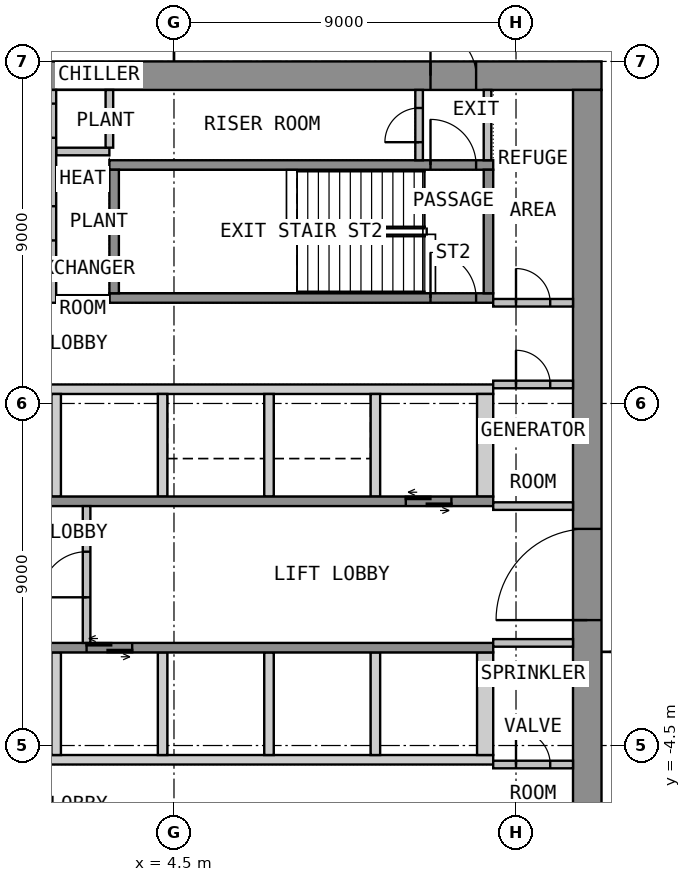
"""IFC4 building model, lengths in metres.
Left out: names, types, materials, properties, quantities, classifications, styles, units other than length and angle.
Written with IfcOpenShell. Run it as: python <this file> out.ifc"""

import sys

from ifc_helpers import new_model, si_unit, direction, frame, frame_2d, origin, place, context, subcontext, project, spatial, polyline, rectangle, outline, extrude, element, fill, save


model = new_model("IFC4")
c1 = context("Model", 3, precision=1e-05, world=origin(), true_north=direction((0.0, 1.0)))
c2 = subcontext(c1, "Body", "Model", "MODEL_VIEW")
j1 = project(units=[si_unit("LENGTHUNIT", "METRE"), si_unit("PLANEANGLEUNIT", "RADIAN")], contexts=[c1])
p1 = place(None, origin())
s1 = spatial("IfcSite", under=j1, at=p1, CompositionType="ELEMENT")
p2 = place(p1, origin())
s2 = spatial("IfcBuilding", under=s1, at=p2, CompositionType="ELEMENT")
p3 = place(p2, frame((0.0, 0.0, 128.1)))
s3 = spatial("IfcBuildingStorey", under=s2, at=p3, CompositionType="ELEMENT", Elevation=128.1)
p4 = place(p3, frame((-15.75, 13.125, 0.0), z_axis=(0.0, 0.0, 1.0), x_axis=(1.0, 0.0, 0.0)))
e1 = element("IfcWall", 1, at=p4, inside=s3, PredefinedType="SHEAR", context=c2, shape_type="SweptSolid", body=[
    extrude(rectangle(XDim=31.5, YDim=0.75, at=frame_2d((15.75, 0.0))), origin(), (0.0, 0.0, 1.0), 4.175),
])
p5 = place(p4, frame((14.55, 0.0, 0.0)))
e2 = element("IfcOpeningElement", 2, at=p5, cuts=e1, PredefinedType="OPENING", context=c2, shape_type="SweptSolid", body=[
    extrude(rectangle(XDim=2.4, YDim=2.1, at=frame_2d((1.2, 1.05))), frame((0.0, 0.385, 0.0), z_axis=(0.0, -1.0, 0.0), x_axis=(1.0, 0.0, 0.0)), (0.0, 0.0, 1.0), 0.77),
])
p6 = place(p4, frame((3.3, 0.0, 0.0)))
e3 = element("IfcOpeningElement", 3, at=p6, cuts=e1, PredefinedType="OPENING", context=c2, shape_type="SweptSolid", body=[
    extrude(rectangle(XDim=1.2, YDim=2.1, at=frame_2d((0.6, 1.05))), frame((0.0, 0.385, 0.0), z_axis=(0.0, -1.0, 0.0), x_axis=(1.0, 0.0, 0.0)), (0.0, 0.0, 1.0), 0.77),
])
p7 = place(p4, frame((27.0, 0.0, 0.0)))
e4 = element("IfcOpeningElement", 4, at=p7, cuts=e1, PredefinedType="OPENING", context=c2, shape_type="SweptSolid", body=[
    extrude(rectangle(XDim=1.2, YDim=2.1, at=frame_2d((0.6, 1.05))), frame((0.0, 0.385, 0.0), z_axis=(0.0, -1.0, 0.0), x_axis=(1.0, 0.0, 0.0)), (0.0, 0.0, 1.0), 0.77),
])
p8 = place(p3, frame((15.375, -12.75, 0.0), z_axis=(0.0, 0.0, 1.0), x_axis=(0.0, 1.0, 0.0)))
e5 = element("IfcWall", 5, at=p8, inside=s3, PredefinedType="SHEAR", context=c2, shape_type="SweptSolid", body=[
    extrude(rectangle(XDim=25.5, YDim=0.75, at=frame_2d((12.75, 0.0))), origin(), (0.0, 0.0, 1.0), 4.175),
])
p9 = place(p8, frame((11.55, 0.0, 0.0)))
e6 = element("IfcOpeningElement", 6, at=p9, cuts=e5, PredefinedType="OPENING", context=c2, shape_type="SweptSolid", body=[
    extrude(rectangle(XDim=2.4, YDim=2.1, at=frame_2d((1.2, 1.05))), frame((0.0, 0.385, 0.0), z_axis=(0.0, -1.0, 0.0), x_axis=(1.0, 0.0, 0.0)), (0.0, 0.0, 1.0), 0.77),
])
p10 = place(p3, origin())
e7 = element("IfcWall", 7, at=p10, inside=s3, PredefinedType="SHEAR", context=c2, shape_type="SweptSolid", body=[
    extrude(outline(polyline([(-12.9, 4.75), (12.9, 4.75), (12.9, 5.0), (-12.9, 5.0), (-12.9, 4.75)])), origin(), (0.0, 0.0, 1.0), 4.175),
])
p11 = place(p3, origin())
e8 = element("IfcWall", 8, at=p11, inside=s3, PredefinedType="SHEAR", context=c2, shape_type="SweptSolid", body=[
    extrude(outline(polyline([(1.275, 2.05), (1.525, 2.05), (1.525, 4.75), (1.275, 4.75), (1.275, 2.05)])), origin(), (0.0, 0.0, 1.0), 4.175),
])
p12 = place(p3, origin())
e9 = element("IfcWall", 9, at=p12, inside=s3, PredefinedType="SHEAR", context=c2, shape_type="SweptSolid", body=[
    extrude(outline(polyline([(4.075, 2.05), (4.325, 2.05), (4.325, 4.75), (4.075, 4.75), (4.075, 2.05)])), origin(), (0.0, 0.0, 1.0), 4.175),
])
p13 = place(p3, origin())
e10 = element("IfcWall", 10, at=p13, inside=s3, PredefinedType="SHEAR", context=c2, shape_type="SweptSolid", body=[
    extrude(outline(polyline([(6.875, 2.05), (7.125, 2.05), (7.125, 4.75), (6.875, 4.75), (6.875, 2.05)])), origin(), (0.0, 0.0, 1.0), 4.175),
])
p14 = place(p3, origin())
e11 = element("IfcWall", 11, at=p14, inside=s3, PredefinedType="SHEAR", context=c2, shape_type="SweptSolid", body=[
    extrude(outline(polyline([(9.675, 2.05), (9.925, 2.05), (9.925, 4.75), (9.675, 4.75), (9.675, 2.05)])), origin(), (0.0, 0.0, 1.0), 4.175),
])
p15 = place(p3, origin())
e12 = element("IfcWall", 12, at=p15, inside=s3, PredefinedType="SHEAR", context=c2, shape_type="SweptSolid", body=[
    extrude(outline(polyline([(12.475, 2.05), (12.9, 2.05), (12.9, 4.75), (12.475, 4.75), (12.475, 2.05)])), origin(), (0.0, 0.0, 1.0), 4.175),
])
p16 = place(p3, frame((-12.9, 1.925, 0.0), z_axis=(0.0, 0.0, 1.0), x_axis=(1.0, 0.0, 0.0)))
e13 = element("IfcWall", 13, at=p16, inside=s3, PredefinedType="SHEAR", context=c2, shape_type="SweptSolid", body=[
    extrude(rectangle(XDim=25.8, YDim=0.25, at=frame_2d((12.9, 0.0))), origin(), (0.0, 0.0, 1.0), 4.175),
])
p17 = place(p16, frame((12.3, 0.0, 0.0)))
e14 = element("IfcOpeningElement", 14, at=p17, cuts=e13, PredefinedType="OPENING", context=c2, shape_type="SweptSolid", body=[
    extrude(rectangle(XDim=1.2, YDim=2.1, at=frame_2d((0.6, 1.05))), frame((0.0, 0.135, 0.0), z_axis=(0.0, -1.0, 0.0), x_axis=(1.0, 0.0, 0.0)), (0.0, 0.0, 1.0), 0.27),
])
p18 = place(p16, frame((23.5, 0.0, 0.0)))
e15 = element("IfcOpeningElement", 15, at=p18, cuts=e13, PredefinedType="OPENING", context=c2, shape_type="SweptSolid", body=[
    extrude(rectangle(XDim=1.2, YDim=2.1, at=frame_2d((0.6, 1.05))), frame((0.0, 0.135, 0.0), z_axis=(0.0, -1.0, 0.0), x_axis=(1.0, 0.0, 0.0)), (0.0, 0.0, 1.0), 0.27),
])
p19 = place(p3, origin())
e16 = element("IfcWall", 16, at=p19, inside=s3, PredefinedType="SHEAR", context=c2, shape_type="SweptSolid", body=[
    extrude(outline(polyline([(-12.9, -5.0), (12.9, -5.0), (12.9, -4.75), (-12.9, -4.75), (-12.9, -5.0)])), origin(), (0.0, 0.0, 1.0), 4.175),
])
p20 = place(p3, origin())
e17 = element("IfcWall", 17, at=p20, inside=s3, PredefinedType="SHEAR", context=c2, shape_type="SweptSolid", body=[
    extrude(outline(polyline([(1.275, -4.75), (1.525, -4.75), (1.525, -2.05), (1.275, -2.05), (1.275, -4.75)])), origin(), (0.0, 0.0, 1.0), 4.175),
])
p21 = place(p3, origin())
e18 = element("IfcWall", 18, at=p21, inside=s3, PredefinedType="SHEAR", context=c2, shape_type="SweptSolid", body=[
    extrude(outline(polyline([(4.075, -4.75), (4.325, -4.75), (4.325, -2.05), (4.075, -2.05), (4.075, -4.75)])), origin(), (0.0, 0.0, 1.0), 4.175),
])
p22 = place(p3, origin())
e19 = element("IfcWall", 19, at=p22, inside=s3, PredefinedType="SHEAR", context=c2, shape_type="SweptSolid", body=[
    extrude(outline(polyline([(6.875, -4.75), (7.125, -4.75), (7.125, -2.05), (6.875, -2.05), (6.875, -4.75)])), origin(), (0.0, 0.0, 1.0), 4.175),
])
p23 = place(p3, origin())
e20 = element("IfcWall", 20, at=p23, inside=s3, PredefinedType="SHEAR", context=c2, shape_type="SweptSolid", body=[
    extrude(outline(polyline([(9.675, -4.75), (9.925, -4.75), (9.925, -2.05), (9.675, -2.05), (9.675, -4.75)])), origin(), (0.0, 0.0, 1.0), 4.175),
])
p24 = place(p3, origin())
e21 = element("IfcWall", 21, at=p24, inside=s3, PredefinedType="SHEAR", context=c2, shape_type="SweptSolid", body=[
    extrude(outline(polyline([(12.475, -4.75), (12.9, -4.75), (12.9, -2.05), (12.475, -2.05), (12.475, -4.75)])), origin(), (0.0, 0.0, 1.0), 4.175),
])
p25 = place(p3, frame((-12.9, -1.925, 0.0), z_axis=(0.0, 0.0, 1.0), x_axis=(1.0, 0.0, 0.0)))
e22 = element("IfcWall", 22, at=p25, inside=s3, PredefinedType="SHEAR", context=c2, shape_type="SweptSolid", body=[
    extrude(rectangle(XDim=25.8, YDim=0.25, at=frame_2d((12.9, 0.0))), origin(), (0.0, 0.0, 1.0), 4.175),
])
p26 = place(p25, frame((12.3, 0.0, 0.0)))
e23 = element("IfcOpeningElement", 23, at=p26, cuts=e22, PredefinedType="OPENING", context=c2, shape_type="SweptSolid", body=[
    extrude(rectangle(XDim=1.2, YDim=2.1, at=frame_2d((0.6, 1.05))), frame((0.0, 0.135, 0.0), z_axis=(0.0, -1.0, 0.0), x_axis=(1.0, 0.0, 0.0)), (0.0, 0.0, 1.0), 0.27),
])
p27 = place(p25, frame((15.1, 0.0, 0.0)))
e24 = element("IfcOpeningElement", 24, at=p27, cuts=e22, PredefinedType="OPENING", context=c2, shape_type="SweptSolid", body=[
    extrude(rectangle(XDim=1.2, YDim=2.1, at=frame_2d((0.6, 1.05))), frame((0.0, 0.135, 0.0), z_axis=(0.0, -1.0, 0.0), x_axis=(1.0, 0.0, 0.0)), (0.0, 0.0, 1.0), 0.27),
])
p28 = place(p3, frame((2.2, -1.8, 0.0), z_axis=(0.0, 0.0, 1.0), x_axis=(0.0, 1.0, 0.0)))
e25 = element("IfcWall", 25, at=p28, inside=s3, PredefinedType="PARTITIONING", context=c2, shape_type="SweptSolid", body=[
    extrude(rectangle(XDim=3.6, YDim=0.2, at=frame_2d((1.8, 0.0))), origin(), (0.0, 0.0, 1.0), 4.175),
])
p29 = place(p28, frame((1.2, 0.0, 0.0)))
e26 = element("IfcOpeningElement", 26, at=p29, cuts=e25, PredefinedType="OPENING", context=c2, shape_type="SweptSolid", body=[
    extrude(rectangle(XDim=1.2, YDim=2.1, at=frame_2d((0.6, 1.05))), frame((0.0, 0.11, 0.0), z_axis=(0.0, -1.0, 0.0), x_axis=(1.0, 0.0, 0.0)), (0.0, 0.0, 1.0), 0.22),
])
p30 = place(p3, frame((2.8, 7.275, 0.0), z_axis=(0.0, 0.0, 1.0), x_axis=(1.0, 0.0, 0.0)))
e27 = element("IfcWall", 27, at=p30, inside=s3, PredefinedType="SHEAR", context=c2, shape_type="SweptSolid", body=[
    extrude(rectangle(XDim=10.1, YDim=0.25, at=frame_2d((5.05, 0.0))), origin(), (0.0, 0.0, 1.0), 4.175),
])
p31 = place(p30, frame((8.45, 0.0, 0.0)))
e28 = element("IfcOpeningElement", 28, at=p31, cuts=e27, PredefinedType="OPENING", context=c2, shape_type="SweptSolid", body=[
    extrude(rectangle(XDim=1.2, YDim=2.1, at=frame_2d((0.6, 1.05))), frame((0.0, 0.135, 0.0), z_axis=(0.0, -1.0, 0.0), x_axis=(1.0, 0.0, 0.0)), (0.0, 0.0, 1.0), 0.27),
])
p32 = place(p3, frame((2.8, 10.775, 0.0), z_axis=(0.0, 0.0, 1.0), x_axis=(1.0, 0.0, 0.0)))
e29 = element("IfcWall", 29, at=p32, inside=s3, PredefinedType="SHEAR", context=c2, shape_type="SweptSolid", body=[
    extrude(rectangle(XDim=10.1, YDim=0.25, at=frame_2d((5.05, 0.0))), origin(), (0.0, 0.0, 1.0), 4.175),
])
p33 = place(p32, frame((8.45, 0.0, 0.0)))
e30 = element("IfcOpeningElement", 30, at=p33, cuts=e29, PredefinedType="OPENING", context=c2, shape_type="SweptSolid", body=[
    extrude(rectangle(XDim=1.2, YDim=2.1, at=frame_2d((0.6, 1.05))), frame((0.0, 0.135, 0.0), z_axis=(0.0, -1.0, 0.0), x_axis=(1.0, 0.0, 0.0)), (0.0, 0.0, 1.0), 0.27),
])
for number, where, z_axis, x_axis in (
    (31, (2.925, 7.4, 0.0), (0.0, 0.0, 1.0), (0.0, 1.0, 0.0)),
    (32, (12.775, 7.4, 0.0), (0.0, 0.0, 1.0), (0.0, 1.0, 0.0)),
):
    element("IfcWall", number, at=place(p3, frame(where, z_axis=z_axis, x_axis=x_axis)), inside=s3, PredefinedType="SHEAR", context=c2, shape_type="SweptSolid", body=[
        extrude(rectangle(XDim=3.25, YDim=0.25, at=frame_2d((1.625, 0.0))), origin(), (0.0, 0.0, 1.0), 4.175),
    ])
for number, where, z_axis, x_axis in (
    (33, (1.4, 7.25, 0.0), (0.0, 0.0, 1.0), (1.0, 0.0, 0.0)),
    (34, (1.4, 11.13, 0.0), (0.0, 0.0, 1.0), (1.0, 0.0, 0.0)),
):
    element("IfcWall", number, at=place(p3, frame(where, z_axis=z_axis, x_axis=x_axis)), inside=s3, PredefinedType="PARTITIONING", context=c2, shape_type="SweptSolid", body=[
        extrude(rectangle(XDim=1.4, YDim=0.2, at=frame_2d((0.7, 0.0))), origin(), (0.0, 0.0, 1.0), 4.175),
    ])
p34 = place(p3, frame((1.3, 7.15, 0.0), z_axis=(0.0, 0.0, 1.0), x_axis=(0.0, 1.0, 0.0)))
e35 = element("IfcWall", 35, at=p34, inside=s3, PredefinedType="PARTITIONING", context=c2, shape_type="SweptSolid", body=[
    extrude(rectangle(XDim=5.6, YDim=0.2, at=frame_2d((2.8, 0.0))), origin(), (0.0, 0.0, 1.0), 4.175),
])
p35 = place(p34, frame((1.64, 0.0, 0.0)))
e36 = element("IfcOpeningElement", 36, at=p35, cuts=e35, PredefinedType="OPENING", context=c2, shape_type="SweptSolid", body=[
    extrude(rectangle(XDim=0.9, YDim=2.1, at=frame_2d((0.45, 1.05))), frame((0.0, 0.11, 0.0), z_axis=(0.0, -1.0, 0.0), x_axis=(1.0, 0.0, 0.0)), (0.0, 0.0, 1.0), 0.22),
])
p36 = place(p34, frame((4.34, 0.0, 0.0)))
e37 = element("IfcOpeningElement", 37, at=p36, cuts=e35, PredefinedType="OPENING", context=c2, shape_type="SweptSolid", body=[
    extrude(rectangle(XDim=0.9, YDim=2.1, at=frame_2d((0.45, 1.05))), frame((0.0, 0.11, 0.0), z_axis=(0.0, -1.0, 0.0), x_axis=(1.0, 0.0, 0.0)), (0.0, 0.0, 1.0), 0.22),
])
p37 = place(p3, frame((12.75, 10.9, 0.0), z_axis=(0.0, 0.0, 1.0), x_axis=(0.0, 1.0, 0.0)))
e38 = element("IfcWall", 38, at=p37, inside=s3, PredefinedType="PARTITIONING", context=c2, shape_type="SweptSolid", body=[
    extrude(rectangle(XDim=1.85, YDim=0.2, at=frame_2d((0.925, 0.0))), origin(), (0.0, 0.0, 1.0), 4.175),
])
p38 = place(p3, frame((10.95, 10.9, 0.0), z_axis=(0.0, 0.0, 1.0), x_axis=(0.0, 1.0, 0.0)))
e39 = element("IfcWall", 39, at=p38, inside=s3, PredefinedType="PARTITIONING", context=c2, shape_type="SweptSolid", body=[
    extrude(rectangle(XDim=1.85, YDim=0.2, at=frame_2d((0.925, 0.0))), origin(), (0.0, 0.0, 1.0), 4.175),
])
p39 = place(p38, frame((0.475, 0.0, 0.0)))
e40 = element("IfcOpeningElement", 40, at=p39, cuts=e39, PredefinedType="OPENING", context=c2, shape_type="SweptSolid", body=[
    extrude(rectangle(XDim=0.9, YDim=2.1, at=frame_2d((0.45, 1.05))), frame((0.0, 0.11, 0.0), z_axis=(0.0, -1.0, 0.0), x_axis=(1.0, 0.0, 0.0)), (0.0, 0.0, 1.0), 0.22),
])
p40 = place(p3, frame((12.9, 7.15, 0.0), z_axis=(0.0, 0.0, 1.0), x_axis=(1.0, 0.0, 0.0)))
e41 = element("IfcWall", 41, at=p40, inside=s3, PredefinedType="PARTITIONING", context=c2, shape_type="SweptSolid", body=[
    extrude(rectangle(XDim=2.1, YDim=0.2, at=frame_2d((1.05, 0.0))), origin(), (0.0, 0.0, 1.0), 4.175),
])
p41 = place(p40, frame((0.6, 0.0, 0.0)))
e42 = element("IfcOpeningElement", 42, at=p41, cuts=e41, PredefinedType="OPENING", context=c2, shape_type="SweptSolid", body=[
    extrude(rectangle(XDim=0.9, YDim=2.1, at=frame_2d((0.45, 1.05))), frame((0.0, 0.11, 0.0), z_axis=(0.0, -1.0, 0.0), x_axis=(1.0, 0.0, 0.0)), (0.0, 0.0, 1.0), 0.22),
])
p42 = place(p3, frame((12.9, 5.0, 0.0), z_axis=(0.0, 0.0, 1.0), x_axis=(1.0, 0.0, 0.0)))
e43 = element("IfcWall", 43, at=p42, inside=s3, PredefinedType="PARTITIONING", context=c2, shape_type="SweptSolid", body=[
    extrude(rectangle(XDim=2.1, YDim=0.2, at=frame_2d((1.05, 0.0))), origin(), (0.0, 0.0, 1.0), 4.175),
])
p43 = place(p42, frame((0.6, 0.0, 0.0)))
e44 = element("IfcOpeningElement", 44, at=p43, cuts=e43, PredefinedType="OPENING", context=c2, shape_type="SweptSolid", body=[
    extrude(rectangle(XDim=0.9, YDim=2.1, at=frame_2d((0.45, 1.05))), frame((0.0, 0.11, 0.0), z_axis=(0.0, -1.0, 0.0), x_axis=(1.0, 0.0, 0.0)), (0.0, 0.0, 1.0), 0.22),
])
p44 = place(p3, frame((12.9, 1.8, 0.0), z_axis=(0.0, 0.0, 1.0), x_axis=(1.0, 0.0, 0.0)))
e45 = element("IfcWall", 45, at=p44, inside=s3, PredefinedType="PARTITIONING", context=c2, shape_type="SweptSolid", body=[
    extrude(rectangle(XDim=2.1, YDim=0.2, at=frame_2d((1.05, 0.0))), origin(), (0.0, 0.0, 1.0), 4.175),
])
p45 = place(p3, frame((12.9, -5.0, 0.0), z_axis=(0.0, 0.0, 1.0), x_axis=(1.0, 0.0, 0.0)))
e46 = element("IfcWall", 46, at=p45, inside=s3, PredefinedType="PARTITIONING", context=c2, shape_type="SweptSolid", body=[
    extrude(rectangle(XDim=2.1, YDim=0.2, at=frame_2d((1.05, 0.0))), origin(), (0.0, 0.0, 1.0), 4.175),
])
p46 = place(p45, frame((0.6, 0.0, 0.0)))
e47 = element("IfcOpeningElement", 47, at=p46, cuts=e46, PredefinedType="OPENING", context=c2, shape_type="SweptSolid", body=[
    extrude(rectangle(XDim=0.9, YDim=2.1, at=frame_2d((0.45, 1.05))), frame((0.0, 0.11, 0.0), z_axis=(0.0, -1.0, 0.0), x_axis=(1.0, 0.0, 0.0)), (0.0, 0.0, 1.0), 0.22),
])
p47 = place(p3, frame((12.9, -1.8, 0.0), z_axis=(0.0, 0.0, 1.0), x_axis=(1.0, 0.0, 0.0)))
e48 = element("IfcWall", 48, at=p47, inside=s3, PredefinedType="PARTITIONING", context=c2, shape_type="SweptSolid", body=[
    extrude(rectangle(XDim=2.1, YDim=0.2, at=frame_2d((1.05, 0.0))), origin(), (0.0, 0.0, 1.0), 4.175),
])
p48 = place(p3, frame((2.8, 12.749, 0.0), z_axis=(0.0, 0.0, 1.0), x_axis=(0.0, -1.0, 0.0)))
e49 = element("IfcWall", 49, at=p48, inside=s3, PredefinedType="PARTITIONING", context=c2, shape_type="SweptSolid", body=[
    extrude(rectangle(XDim=1.518, YDim=0.2, at=frame_2d((0.759, 0.0))), origin(), (0.0, 0.0, 1.0), 4.175),
])
p49 = place(p9, origin())
e50 = element("IfcDoor", 50, at=p49, inside=s3, OperationType="DOUBLE_DOOR_DOUBLE_SWING", PredefinedType="DOOR", context=c2, shape_type="SweptSolid", body=[
    extrude(rectangle(XDim=2.4, YDim=2.1, at=frame_2d((1.2, 1.05))), frame((0.0, 0.025, 0.0), z_axis=(0.0, -1.0, 0.0), x_axis=(1.0, 0.0, 0.0)), (0.0, 0.0, 1.0), 0.05),
])
fill(e6, e50)
p50 = place(p7, origin())
e51 = element("IfcDoor", 51, at=p50, inside=s3, OperationType="SINGLE_SWING_RIGHT", PredefinedType="DOOR", context=c2, shape_type="SweptSolid", body=[
    extrude(rectangle(XDim=1.2, YDim=2.1, at=frame_2d((0.6, 1.05))), frame((0.0, 0.025, 0.0), z_axis=(0.0, -1.0, 0.0), x_axis=(1.0, 0.0, 0.0)), (0.0, 0.0, 1.0), 0.05),
])
fill(e4, e51)
p51 = place(p18, origin())
e52 = element("IfcDoor", 52, at=p51, inside=s3, OperationType="DOUBLE_DOOR_SLIDING", PredefinedType="DOOR", context=c2, shape_type="SweptSolid", body=[
    extrude(rectangle(XDim=1.2, YDim=2.1, at=frame_2d((0.6, 1.05))), frame((0.0, 0.025, 0.0), z_axis=(0.0, -1.0, 0.0), x_axis=(1.0, 0.0, 0.0)), (0.0, 0.0, 1.0), 0.05),
])
fill(e15, e52)
p52 = place(p27, origin())
e53 = element("IfcDoor", 53, at=p52, inside=s3, OperationType="DOUBLE_DOOR_SLIDING", PredefinedType="DOOR", context=c2, shape_type="SweptSolid", body=[
    extrude(rectangle(XDim=1.2, YDim=2.1, at=frame_2d((0.6, 1.05))), frame((0.0, 0.025, 0.0), z_axis=(0.0, -1.0, 0.0), x_axis=(1.0, 0.0, 0.0)), (0.0, 0.0, 1.0), 0.05),
])
fill(e24, e53)
p53 = place(p29, origin())
e54 = element("IfcDoor", 54, at=p53, inside=s3, OperationType="SINGLE_SWING_LEFT", PredefinedType="DOOR", context=c2, shape_type="SweptSolid", body=[
    extrude(rectangle(XDim=1.2, YDim=2.1, at=frame_2d((0.6, 1.05))), frame((0.0, 0.025, 0.0), z_axis=(0.0, -1.0, 0.0), x_axis=(1.0, 0.0, 0.0)), (0.0, 0.0, 1.0), 0.05),
])
fill(e26, e54)
p54 = place(p31, origin())
e55 = element("IfcDoor", 55, at=p54, inside=s3, OperationType="SINGLE_SWING_LEFT", PredefinedType="DOOR", context=c2, shape_type="SweptSolid", body=[
    extrude(rectangle(XDim=1.2, YDim=2.1, at=frame_2d((0.6, 1.05))), frame((0.0, 0.025, 0.0), z_axis=(0.0, -1.0, 0.0), x_axis=(1.0, 0.0, 0.0)), (0.0, 0.0, 1.0), 0.05),
])
fill(e28, e55)
p55 = place(p35, origin())
e56 = element("IfcDoor", 56, at=p55, inside=s3, OperationType="SINGLE_SWING_LEFT", PredefinedType="DOOR", context=c2, shape_type="SweptSolid", body=[
    extrude(rectangle(XDim=0.9, YDim=2.1, at=frame_2d((0.45, 1.05))), frame((0.0, 0.025, 0.0), z_axis=(0.0, -1.0, 0.0), x_axis=(1.0, 0.0, 0.0)), (0.0, 0.0, 1.0), 0.05),
])
fill(e36, e56)
p56 = place(p36, origin())
e57 = element("IfcDoor", 57, at=p56, inside=s3, OperationType="SINGLE_SWING_LEFT", PredefinedType="DOOR", context=c2, shape_type="SweptSolid", body=[
    extrude(rectangle(XDim=0.9, YDim=2.1, at=frame_2d((0.45, 1.05))), frame((0.0, 0.025, 0.0), z_axis=(0.0, -1.0, 0.0), x_axis=(1.0, 0.0, 0.0)), (0.0, 0.0, 1.0), 0.05),
])
fill(e37, e57)
p57 = place(p33, origin())
e58 = element("IfcDoor", 58, at=p57, inside=s3, OperationType="SINGLE_SWING_RIGHT", PredefinedType="DOOR", context=c2, shape_type="SweptSolid", body=[
    extrude(rectangle(XDim=1.2, YDim=2.1, at=frame_2d((0.6, 1.05))), frame((0.0, 0.025, 0.0), z_axis=(0.0, -1.0, 0.0), x_axis=(1.0, 0.0, 0.0)), (0.0, 0.0, 1.0), 0.05),
])
fill(e30, e58)
p58 = place(p39, origin())
e59 = element("IfcDoor", 59, at=p58, inside=s3, OperationType="SINGLE_SWING_LEFT", PredefinedType="DOOR", context=c2, shape_type="SweptSolid", body=[
    extrude(rectangle(XDim=0.9, YDim=2.1, at=frame_2d((0.45, 1.05))), frame((0.0, 0.025, 0.0), z_axis=(0.0, -1.0, 0.0), x_axis=(1.0, 0.0, 0.0)), (0.0, 0.0, 1.0), 0.05),
])
fill(e40, e59)
p59 = place(p41, origin())
e60 = element("IfcDoor", 60, at=p59, inside=s3, OperationType="SINGLE_SWING_LEFT", PredefinedType="DOOR", context=c2, shape_type="SweptSolid", body=[
    extrude(rectangle(XDim=0.9, YDim=2.1, at=frame_2d((0.45, 1.05))), frame((0.0, 0.025, 0.0), z_axis=(0.0, -1.0, 0.0), x_axis=(1.0, 0.0, 0.0)), (0.0, 0.0, 1.0), 0.05),
])
fill(e42, e60)
p60 = place(p43, origin())
e61 = element("IfcDoor", 61, at=p60, inside=s3, OperationType="SINGLE_SWING_LEFT", PredefinedType="DOOR", context=c2, shape_type="SweptSolid", body=[
    extrude(rectangle(XDim=0.9, YDim=2.1, at=frame_2d((0.45, 1.05))), frame((0.0, 0.025, 0.0), z_axis=(0.0, -1.0, 0.0), x_axis=(1.0, 0.0, 0.0)), (0.0, 0.0, 1.0), 0.05),
])
fill(e44, e61)
p61 = place(p46, origin())
e62 = element("IfcDoor", 62, at=p61, inside=s3, OperationType="SINGLE_SWING_LEFT", PredefinedType="DOOR", context=c2, shape_type="SweptSolid", body=[
    extrude(rectangle(XDim=0.9, YDim=2.1, at=frame_2d((0.45, 1.05))), frame((0.0, 0.025, 0.0), z_axis=(0.0, -1.0, 0.0), x_axis=(1.0, 0.0, 0.0)), (0.0, 0.0, 1.0), 0.05),
])
fill(e47, e62)
save(model, sys.argv[1])
